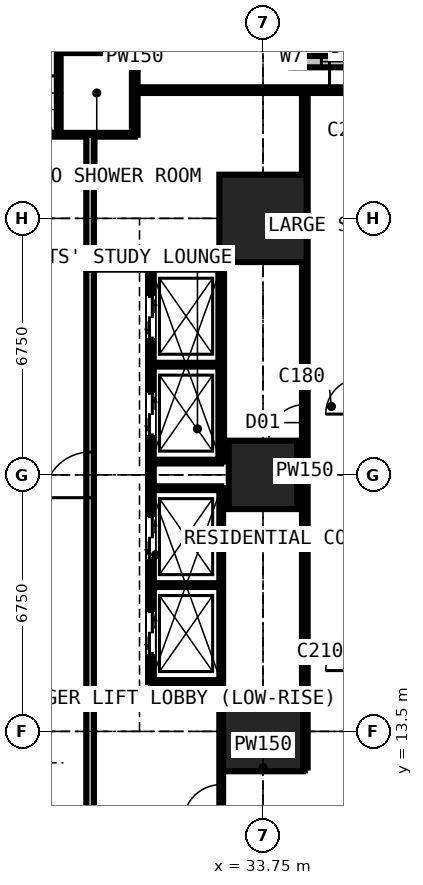
"""IFC4 building model, lengths in metres.
Left out: names, types, materials, properties, quantities, classifications, styles, units other than length and angle.
Written with IfcOpenShell. Run it as: python <this file> out.ifc"""

import sys

from ifc_helpers import new_model, si_unit, direction, frame, frame_2d, origin, origin_2d, place, context, subcontext, project, spatial, rectangle, extrude, element, fill, save


model = new_model("IFC4")
c1 = context("Model", 3, precision=1e-05, world=origin(), true_north=direction((0.0, 1.0)))
c2 = subcontext(c1, "Body", "Model", "MODEL_VIEW")
j1 = project(units=[si_unit("LENGTHUNIT", "METRE"), si_unit("PLANEANGLEUNIT", "RADIAN")], contexts=[c1])
p1 = place(None, origin())
s1 = spatial("IfcSite", under=j1, at=p1, CompositionType="ELEMENT")
p2 = place(p1, origin())
s2 = spatial("IfcBuilding", under=s1, at=p2, CompositionType="ELEMENT")
p3 = place(p2, frame((0.0, 0.0, 80.1)))
s3 = spatial("IfcBuildingStorey", under=s2, at=p3, CompositionType="ELEMENT", Elevation=80.1)
p4 = place(p3, frame((33.75, 13.5, 0.0), z_axis=(0.0, 0.0, 1.0), x_axis=(1.0, 0.0, 0.0)))
e1 = element("IfcColumn", 1, at=p4, inside=s3, PredefinedType="COLUMN", context=c2, shape_type="SweptSolid", body=[
    extrude(rectangle(XDim=2.1, YDim=2.1, at=origin_2d()), origin(), (0.0, 0.0, 1.0), 3.6),
])
p5 = place(p3, frame((33.75, 20.25, 0.0), z_axis=(0.0, 0.0, 1.0), x_axis=(1.0, 0.0, 0.0)))
e2 = element("IfcColumn", 2, at=p5, inside=s3, PredefinedType="COLUMN", context=c2, shape_type="SweptSolid", body=[
    extrude(rectangle(XDim=1.8, YDim=1.8, at=origin_2d()), origin(), (0.0, 0.0, 1.0), 3.6),
])
p6 = place(p3, frame((33.75, 27.0, 0.0), z_axis=(0.0, 0.0, 1.0), x_axis=(1.0, 0.0, 0.0)))
e3 = element("IfcColumn", 3, at=p6, inside=s3, PredefinedType="COLUMN", context=c2, shape_type="SweptSolid", body=[
    extrude(rectangle(XDim=2.3, YDim=2.3, at=origin_2d()), origin(), (0.0, 0.0, 1.0), 3.6),
])
p7 = place(p3, frame((37.875, 31.125, 0.0), z_axis=(0.0, 0.0, 1.0), x_axis=(-1.0, 0.0, 0.0)))
e4 = element("IfcWall", 4, at=p7, inside=s3, PredefinedType="SOLIDWALL", context=c2, shape_type="SweptSolid", body=[
    extrude(rectangle(XDim=3.375, YDim=0.3, at=frame_2d((1.688, 0.0))), origin(), (0.0, 0.0, 1.0), 3.375),
])
p8 = place(p7, frame((0.788, 0.0, 0.6)))
e5 = element("IfcOpeningElement", 5, at=p8, cuts=e4, PredefinedType="OPENING", context=c2, shape_type="SweptSolid", body=[
    extrude(rectangle(XDim=1.8, YDim=2.1, at=frame_2d((0.9, 1.05))), frame((0.0, 0.16, 0.0), z_axis=(0.0, -1.0, 0.0), x_axis=(1.0, 0.0, 0.0)), (0.0, 0.0, 1.0), 0.32),
])
p9 = place(p3, frame((34.5, 31.125, 0.0), z_axis=(0.0, 0.0, 1.0), x_axis=(0.0, 1.0, 0.0)))
e6 = element("IfcWall", 6, at=p9, inside=s3, PredefinedType="SOLIDWALL", context=c2, shape_type="SweptSolid", body=[
    extrude(rectangle(XDim=3.375, YDim=0.3, at=frame_2d((1.688, 0.0))), origin(), (0.0, 0.0, 1.0), 3.375),
])
p10 = place(p9, frame((0.272, 0.0, 0.9)))
e7 = element("IfcOpeningElement", 7, at=p10, cuts=e6, PredefinedType="OPENING", context=c2, shape_type="SweptSolid", body=[
    extrude(rectangle(XDim=0.9, YDim=1.8, at=frame_2d((0.45, 0.9))), frame((0.0, 0.16, 0.0), z_axis=(0.0, -1.0, 0.0), x_axis=(1.0, 0.0, 0.0)), (0.0, 0.0, 1.0), 0.32),
])
p11 = place(p3, frame((11.3, 29.2, 0.0), z_axis=(0.0, 0.0, 1.0), x_axis=(1.0, 0.0, 0.0)))
e8 = element("IfcWall", 8, at=p11, inside=s3, PredefinedType="PARTITIONING", context=c2, shape_type="SweptSolid", body=[
    extrude(rectangle(XDim=19.075, YDim=0.1, at=frame_2d((9.538, 0.0))), origin(), (0.0, 0.0, 1.0), 3.375),
])
p12 = place(p11, frame((6.4, 0.0, 0.0)))
e9 = element("IfcOpeningElement", 9, at=p12, cuts=e8, PredefinedType="OPENING", context=c2, shape_type="SweptSolid", body=[
    extrude(rectangle(XDim=0.95, YDim=2.2, at=frame_2d((0.475, 1.1))), frame((0.0, 0.06, 0.0), z_axis=(0.0, -1.0, 0.0), x_axis=(1.0, 0.0, 0.0)), (0.0, 0.0, 1.0), 0.12),
])
p13 = place(p11, frame((13.15, 0.0, 0.0)))
e10 = element("IfcOpeningElement", 10, at=p13, cuts=e8, PredefinedType="OPENING", context=c2, shape_type="SweptSolid", body=[
    extrude(rectangle(XDim=0.95, YDim=2.2, at=frame_2d((0.475, 1.1))), frame((0.0, 0.06, 0.0), z_axis=(0.0, -1.0, 0.0), x_axis=(1.0, 0.0, 0.0)), (0.0, 0.0, 1.0), 0.12),
])
p14 = place(p11, frame((15.95, 0.0, 0.0)))
e11 = element("IfcOpeningElement", 11, at=p14, cuts=e8, PredefinedType="OPENING", context=c2, shape_type="SweptSolid", body=[
    extrude(rectangle(XDim=0.95, YDim=2.2, at=frame_2d((0.475, 1.1))), frame((0.0, 0.06, 0.0), z_axis=(0.0, -1.0, 0.0), x_axis=(1.0, 0.0, 0.0)), (0.0, 0.0, 1.0), 0.12),
])
p15 = place(p11, frame((0.6, 0.0, 0.0)))
e12 = element("IfcOpeningElement", 12, at=p15, cuts=e8, PredefinedType="OPENING", context=c2, shape_type="SweptSolid", body=[
    extrude(rectangle(XDim=1.0, YDim=2.2, at=frame_2d((0.5, 1.1))), frame((0.0, 0.06, 0.0), z_axis=(0.0, -1.0, 0.0), x_axis=(1.0, 0.0, 0.0)), (0.0, 0.0, 1.0), 0.12),
])
p16 = place(p3, frame((28.375, 29.2, 0.0), z_axis=(0.0, 0.0, 1.0), x_axis=(0.0, 1.0, 0.0)))
e13 = element("IfcWall", 13, at=p16, inside=s3, PredefinedType="PARTITIONING", context=c2, shape_type="SweptSolid", body=[
    extrude(rectangle(XDim=2.2, YDim=0.1, at=frame_2d((1.1, 0.0))), origin(), (0.0, 0.0, 1.0), 3.375),
])
p17 = place(p16, frame((0.65, 0.0, 0.0)))
e14 = element("IfcOpeningElement", 14, at=p17, cuts=e13, PredefinedType="OPENING", context=c2, shape_type="SweptSolid", body=[
    extrude(rectangle(XDim=0.9, YDim=2.2, at=frame_2d((0.45, 1.1))), frame((0.0, 0.06, 0.0), z_axis=(0.0, -1.0, 0.0), x_axis=(1.0, 0.0, 0.0)), (0.0, 0.0, 1.0), 0.12),
])
p18 = place(p3, frame((28.375, 31.4, 0.0), z_axis=(0.0, 0.0, 1.0), x_axis=(1.0, 0.0, 0.0)))
e15 = element("IfcWall", 15, at=p18, inside=s3, PredefinedType="PARTITIONING", context=c2, shape_type="SweptSolid", body=[
    extrude(rectangle(XDim=2.0, YDim=0.1, at=frame_2d((1.0, 0.0))), origin(), (0.0, 0.0, 1.0), 3.375),
])
p19 = place(p3, frame((29.2, 11.3, 0.0), z_axis=(0.0, 0.0, 1.0), x_axis=(0.0, 1.0, 0.0)))
e16 = element("IfcWall", 16, at=p19, inside=s3, PredefinedType="PARTITIONING", context=c2, shape_type="SweptSolid", body=[
    extrude(rectangle(XDim=17.9, YDim=0.2, at=frame_2d((8.95, 0.0))), origin(), (0.0, 0.0, 1.0), 3.375),
])
p20 = place(p19, frame((8.35, 0.0, 0.0)))
e17 = element("IfcOpeningElement", 17, at=p20, cuts=e16, PredefinedType="OPENING", context=c2, shape_type="SweptSolid", body=[
    extrude(rectangle(XDim=1.2, YDim=2.2, at=frame_2d((0.6, 1.1))), frame((0.0, 0.11, 0.0), z_axis=(0.0, -1.0, 0.0), x_axis=(1.0, 0.0, 0.0)), (0.0, 0.0, 1.0), 0.22),
])
p21 = place(p3, frame((29.2, 25.7, 0.0), z_axis=(0.0, 0.0, 1.0), x_axis=(1.0, 0.0, 0.0)))
e18 = element("IfcWall", 18, at=p21, inside=s3, PredefinedType="SHEAR", context=c2, shape_type="SweptSolid", body=[
    extrude(rectangle(XDim=3.45, YDim=0.1, at=frame_2d((1.725, 0.0))), origin(), (0.0, 0.0, 1.0), 3.375),
])
p22 = place(p3, frame((30.375, 29.2, 0.0), z_axis=(0.0, 0.0, 1.0), x_axis=(0.0, 1.0, 0.0)))
e19 = element("IfcWall", 19, at=p22, inside=s3, PredefinedType="PARTITIONING", context=c2, shape_type="SweptSolid", body=[
    extrude(rectangle(XDim=5.284, YDim=0.15, at=frame_2d((2.642, 0.0))), origin(), (0.0, 0.0, 1.0), 3.375),
])
p23 = place(p3, frame((30.375, 30.375, 0.0), z_axis=(0.0, 0.0, 1.0), x_axis=(1.0, 0.0, 0.0)))
e20 = element("IfcWall", 20, at=p23, inside=s3, PredefinedType="PARTITIONING", context=c2, shape_type="SweptSolid", body=[
    extrude(rectangle(XDim=7.35, YDim=0.15, at=frame_2d((3.675, 0.0))), origin(), (0.0, 0.0, 1.0), 2.877),
])
p24 = place(p23, frame((5.125, 0.0, 0.0)))
e21 = element("IfcOpeningElement", 21, at=p24, cuts=e20, PredefinedType="OPENING", context=c2, shape_type="SweptSolid", body=[
    extrude(rectangle(XDim=1.0, YDim=2.2, at=frame_2d((0.5, 1.1))), frame((0.0, 0.085, 0.0), z_axis=(0.0, -1.0, 0.0), x_axis=(1.0, 0.0, 0.0)), (0.0, 0.0, 1.0), 0.17),
])
p25 = place(p3, frame((30.8, 14.8, 0.0), z_axis=(0.0, 0.0, 1.0), x_axis=(0.0, 1.0, 0.0)))
e22 = element("IfcWall", 22, at=p25, inside=s3, PredefinedType="PARTITIONING", context=c2, shape_type="SweptSolid", body=[
    extrude(rectangle(XDim=10.9, YDim=0.15, at=frame_2d((5.45, 0.0))), origin(), (0.0, 0.0, 1.0), 3.375),
])
p26 = place(p25, frame((0.75, 0.0, 0.0)))
e23 = element("IfcOpeningElement", 23, at=p26, cuts=e22, PredefinedType="OPENING", context=c2, shape_type="SweptSolid", body=[
    extrude(rectangle(XDim=1.1, YDim=2.2, at=frame_2d((0.55, 1.1))), frame((0.0, 0.085, 0.0), z_axis=(0.0, -1.0, 0.0), x_axis=(1.0, 0.0, 0.0)), (0.0, 0.0, 1.0), 0.17),
])
p27 = place(p25, frame((3.25, 0.0, 0.0)))
e24 = element("IfcOpeningElement", 24, at=p27, cuts=e22, PredefinedType="OPENING", context=c2, shape_type="SweptSolid", body=[
    extrude(rectangle(XDim=1.1, YDim=2.2, at=frame_2d((0.55, 1.1))), frame((0.0, 0.085, 0.0), z_axis=(0.0, -1.0, 0.0), x_axis=(1.0, 0.0, 0.0)), (0.0, 0.0, 1.0), 0.17),
])
p28 = place(p25, frame((6.5, 0.0, 0.0)))
e25 = element("IfcOpeningElement", 25, at=p28, cuts=e22, PredefinedType="OPENING", context=c2, shape_type="SweptSolid", body=[
    extrude(rectangle(XDim=1.1, YDim=2.2, at=frame_2d((0.55, 1.1))), frame((0.0, 0.085, 0.0), z_axis=(0.0, -1.0, 0.0), x_axis=(1.0, 0.0, 0.0)), (0.0, 0.0, 1.0), 0.17),
])
p29 = place(p25, frame((9.05, 0.0, 0.0)))
e26 = element("IfcOpeningElement", 26, at=p29, cuts=e22, PredefinedType="OPENING", context=c2, shape_type="SweptSolid", body=[
    extrude(rectangle(XDim=1.1, YDim=2.2, at=frame_2d((0.55, 1.1))), frame((0.0, 0.085, 0.0), z_axis=(0.0, -1.0, 0.0), x_axis=(1.0, 0.0, 0.0)), (0.0, 0.0, 1.0), 0.17),
])
for number, where, z_axis, x_axis in (
    (27, (30.8, 14.8, 0.0), (0.0, 0.0, 1.0), (1.0, 0.0, 0.0)),
    (28, (30.8, 17.35, 0.0), (0.0, 0.0, 1.0), (1.0, 0.0, 0.0)),
    (29, (30.8, 19.9, 0.0), (0.0, 0.0, 1.0), (1.0, 0.0, 0.0)),
    (30, (30.8, 20.6, 0.0), (0.0, 0.0, 1.0), (1.0, 0.0, 0.0)),
    (31, (30.8, 23.15, 0.0), (0.0, 0.0, 1.0), (1.0, 0.0, 0.0)),
):
    element("IfcWall", number, at=place(p3, frame(where, z_axis=z_axis, x_axis=x_axis)), inside=s3, PredefinedType="SHEAR", context=c2, shape_type="SweptSolid", body=[
        extrude(rectangle(XDim=1.85, YDim=0.1, at=frame_2d((0.925, 0.0))), origin(), (0.0, 0.0, 1.0), 3.375),
    ])
p30 = place(p3, frame((32.65, 10.6, 0.0), z_axis=(0.0, 0.0, 1.0), x_axis=(0.0, 1.0, 0.0)))
e32 = element("IfcWall", 32, at=p30, inside=s3, PredefinedType="SHEAR", context=c2, shape_type="SweptSolid", body=[
    extrude(rectangle(XDim=9.3, YDim=0.1, at=frame_2d((4.65, 0.0))), origin(), (0.0, 0.0, 1.0), 3.375),
])
p31 = place(p30, frame((0.5, 0.0, 0.0)))
e33 = element("IfcOpeningElement", 33, at=p31, cuts=e32, PredefinedType="OPENING", context=c2, shape_type="SweptSolid", body=[
    extrude(rectangle(XDim=1.0, YDim=2.2, at=frame_2d((0.5, 1.1))), frame((0.0, 0.06, 0.0), z_axis=(0.0, -1.0, 0.0), x_axis=(1.0, 0.0, 0.0)), (0.0, 0.0, 1.0), 0.12),
])
p32 = place(p3, frame((32.65, 12.55, 0.0), z_axis=(0.0, 0.0, 1.0), x_axis=(1.0, 0.0, 0.0)))
e34 = element("IfcWall", 34, at=p32, inside=s3, PredefinedType="PARTITIONING", context=c2, shape_type="SweptSolid", body=[
    extrude(rectangle(XDim=2.2, YDim=0.15, at=frame_2d((1.1, 0.0))), origin(), (0.0, 0.0, 1.0), 3.375),
])
p33 = place(p3, frame((32.65, 20.6, 0.0), z_axis=(0.0, 0.0, 1.0), x_axis=(0.0, 1.0, 0.0)))
e35 = element("IfcWall", 35, at=p33, inside=s3, PredefinedType="PARTITIONING", context=c2, shape_type="SweptSolid", body=[
    extrude(rectangle(XDim=5.1, YDim=0.15, at=frame_2d((2.55, 0.0))), origin(), (0.0, 0.0, 1.0), 3.375),
])
p34 = place(p3, frame((34.85, 12.55, 0.0), z_axis=(0.0, 0.0, 1.0), x_axis=(0.0, 1.0, 0.0)))
e36 = element("IfcWall", 36, at=p34, inside=s3, PredefinedType="PARTITIONING", context=c2, shape_type="SweptSolid", body=[
    extrude(rectangle(XDim=17.825, YDim=0.15, at=frame_2d((8.913, 0.0))), origin(), (0.0, 0.0, 1.0), 3.375),
])
p35 = place(p34, frame((8.6, 0.0, 0.0)))
e37 = element("IfcOpeningElement", 37, at=p35, cuts=e36, PredefinedType="OPENING", context=c2, shape_type="SweptSolid", body=[
    extrude(rectangle(XDim=0.95, YDim=2.2, at=frame_2d((0.475, 1.1))), frame((0.0, 0.085, 0.0), z_axis=(0.0, -1.0, 0.0), x_axis=(1.0, 0.0, 0.0)), (0.0, 0.0, 1.0), 0.17),
])
p36 = place(p8, origin())
e38 = element("IfcWindow", 38, at=p36, inside=s3, PartitioningType="SINGLE_PANEL", PredefinedType="WINDOW", context=c2, shape_type="SweptSolid", body=[
    extrude(rectangle(XDim=1.8, YDim=2.1, at=frame_2d((0.9, 1.05))), frame((0.0, 0.03, 0.0), z_axis=(0.0, -1.0, 0.0), x_axis=(1.0, 0.0, 0.0)), (0.0, 0.0, 1.0), 0.06),
])
fill(e5, e38)
p37 = place(p31, origin())
e39 = element("IfcDoor", 39, at=p37, inside=s3, OperationType="SINGLE_SWING_LEFT", PredefinedType="DOOR", context=c2, shape_type="SweptSolid", body=[
    extrude(rectangle(XDim=1.0, YDim=2.2, at=frame_2d((0.5, 1.1))), frame((0.0, 0.025, 0.0), z_axis=(0.0, -1.0, 0.0), x_axis=(1.0, 0.0, 0.0)), (0.0, 0.0, 1.0), 0.05),
])
fill(e33, e39)
p38 = place(p35, origin())
e40 = element("IfcDoor", 40, at=p38, inside=s3, OperationType="SINGLE_SWING_LEFT", PredefinedType="DOOR", context=c2, shape_type="SweptSolid", body=[
    extrude(rectangle(XDim=0.95, YDim=2.2, at=frame_2d((0.475, 1.1))), frame((0.0, 0.025, 0.0), z_axis=(0.0, -1.0, 0.0), x_axis=(1.0, 0.0, 0.0)), (0.0, 0.0, 1.0), 0.05),
])
fill(e37, e40)
p39 = place(p24, origin())
e41 = element("IfcDoor", 41, at=p39, inside=s3, OperationType="SINGLE_SWING_LEFT", PredefinedType="DOOR", context=c2, shape_type="SweptSolid", body=[
    extrude(rectangle(XDim=1.0, YDim=2.2, at=frame_2d((0.5, 1.1))), frame((0.0, 0.025, 0.0), z_axis=(0.0, -1.0, 0.0), x_axis=(1.0, 0.0, 0.0)), (0.0, 0.0, 1.0), 0.05),
])
fill(e21, e41)
p40 = place(p14, origin())
e42 = element("IfcDoor", 42, at=p40, inside=s3, OperationType="SINGLE_SWING_LEFT", PredefinedType="DOOR", context=c2, shape_type="SweptSolid", body=[
    extrude(rectangle(XDim=0.95, YDim=2.2, at=frame_2d((0.475, 1.1))), frame((0.0, 0.025, 0.0), z_axis=(0.0, -1.0, 0.0), x_axis=(1.0, 0.0, 0.0)), (0.0, 0.0, 1.0), 0.05),
])
fill(e11, e42)
p41 = place(p17, origin())
e43 = element("IfcDoor", 43, at=p41, inside=s3, OperationType="SINGLE_SWING_RIGHT", PredefinedType="DOOR", context=c2, shape_type="SweptSolid", body=[
    extrude(rectangle(XDim=0.9, YDim=2.2, at=frame_2d((0.45, 1.1))), frame((0.0, 0.025, 0.0), z_axis=(0.0, -1.0, 0.0), x_axis=(1.0, 0.0, 0.0)), (0.0, 0.0, 1.0), 0.05),
])
fill(e14, e43)
p42 = place(p26, origin())
e44 = element("IfcDoor", 44, at=p42, inside=s3, OperationType="DOUBLE_DOOR_SLIDING", PredefinedType="DOOR", context=c2, shape_type="SweptSolid", body=[
    extrude(rectangle(XDim=1.1, YDim=2.2, at=frame_2d((0.55, 1.1))), frame((0.0, 0.025, 0.0), z_axis=(0.0, -1.0, 0.0), x_axis=(1.0, 0.0, 0.0)), (0.0, 0.0, 1.0), 0.05),
])
fill(e23, e44)
p43 = place(p27, origin())
e45 = element("IfcDoor", 45, at=p43, inside=s3, OperationType="DOUBLE_DOOR_SLIDING", PredefinedType="DOOR", context=c2, shape_type="SweptSolid", body=[
    extrude(rectangle(XDim=1.1, YDim=2.2, at=frame_2d((0.55, 1.1))), frame((0.0, 0.025, 0.0), z_axis=(0.0, -1.0, 0.0), x_axis=(1.0, 0.0, 0.0)), (0.0, 0.0, 1.0), 0.05),
])
fill(e24, e45)
p44 = place(p28, origin())
e46 = element("IfcDoor", 46, at=p44, inside=s3, OperationType="DOUBLE_DOOR_SLIDING", PredefinedType="DOOR", context=c2, shape_type="SweptSolid", body=[
    extrude(rectangle(XDim=1.1, YDim=2.2, at=frame_2d((0.55, 1.1))), frame((0.0, 0.025, 0.0), z_axis=(0.0, -1.0, 0.0), x_axis=(1.0, 0.0, 0.0)), (0.0, 0.0, 1.0), 0.05),
])
fill(e25, e46)
p45 = place(p29, origin())
e47 = element("IfcDoor", 47, at=p45, inside=s3, OperationType="DOUBLE_DOOR_SLIDING", PredefinedType="DOOR", context=c2, shape_type="SweptSolid", body=[
    extrude(rectangle(XDim=1.1, YDim=2.2, at=frame_2d((0.55, 1.1))), frame((0.0, 0.025, 0.0), z_axis=(0.0, -1.0, 0.0), x_axis=(1.0, 0.0, 0.0)), (0.0, 0.0, 1.0), 0.05),
])
fill(e26, e47)
p46 = place(p20, origin())
e48 = element("IfcDoor", 48, at=p46, inside=s3, OperationType="DOUBLE_DOOR_SINGLE_SWING", PredefinedType="DOOR", context=c2, shape_type="SweptSolid", body=[
    extrude(rectangle(XDim=1.2, YDim=2.2, at=frame_2d((0.6, 1.1))), frame((0.0, 0.025, 0.0), z_axis=(0.0, -1.0, 0.0), x_axis=(1.0, 0.0, 0.0)), (0.0, 0.0, 1.0), 0.05),
])
fill(e17, e48)
save(model, sys.argv[1])
